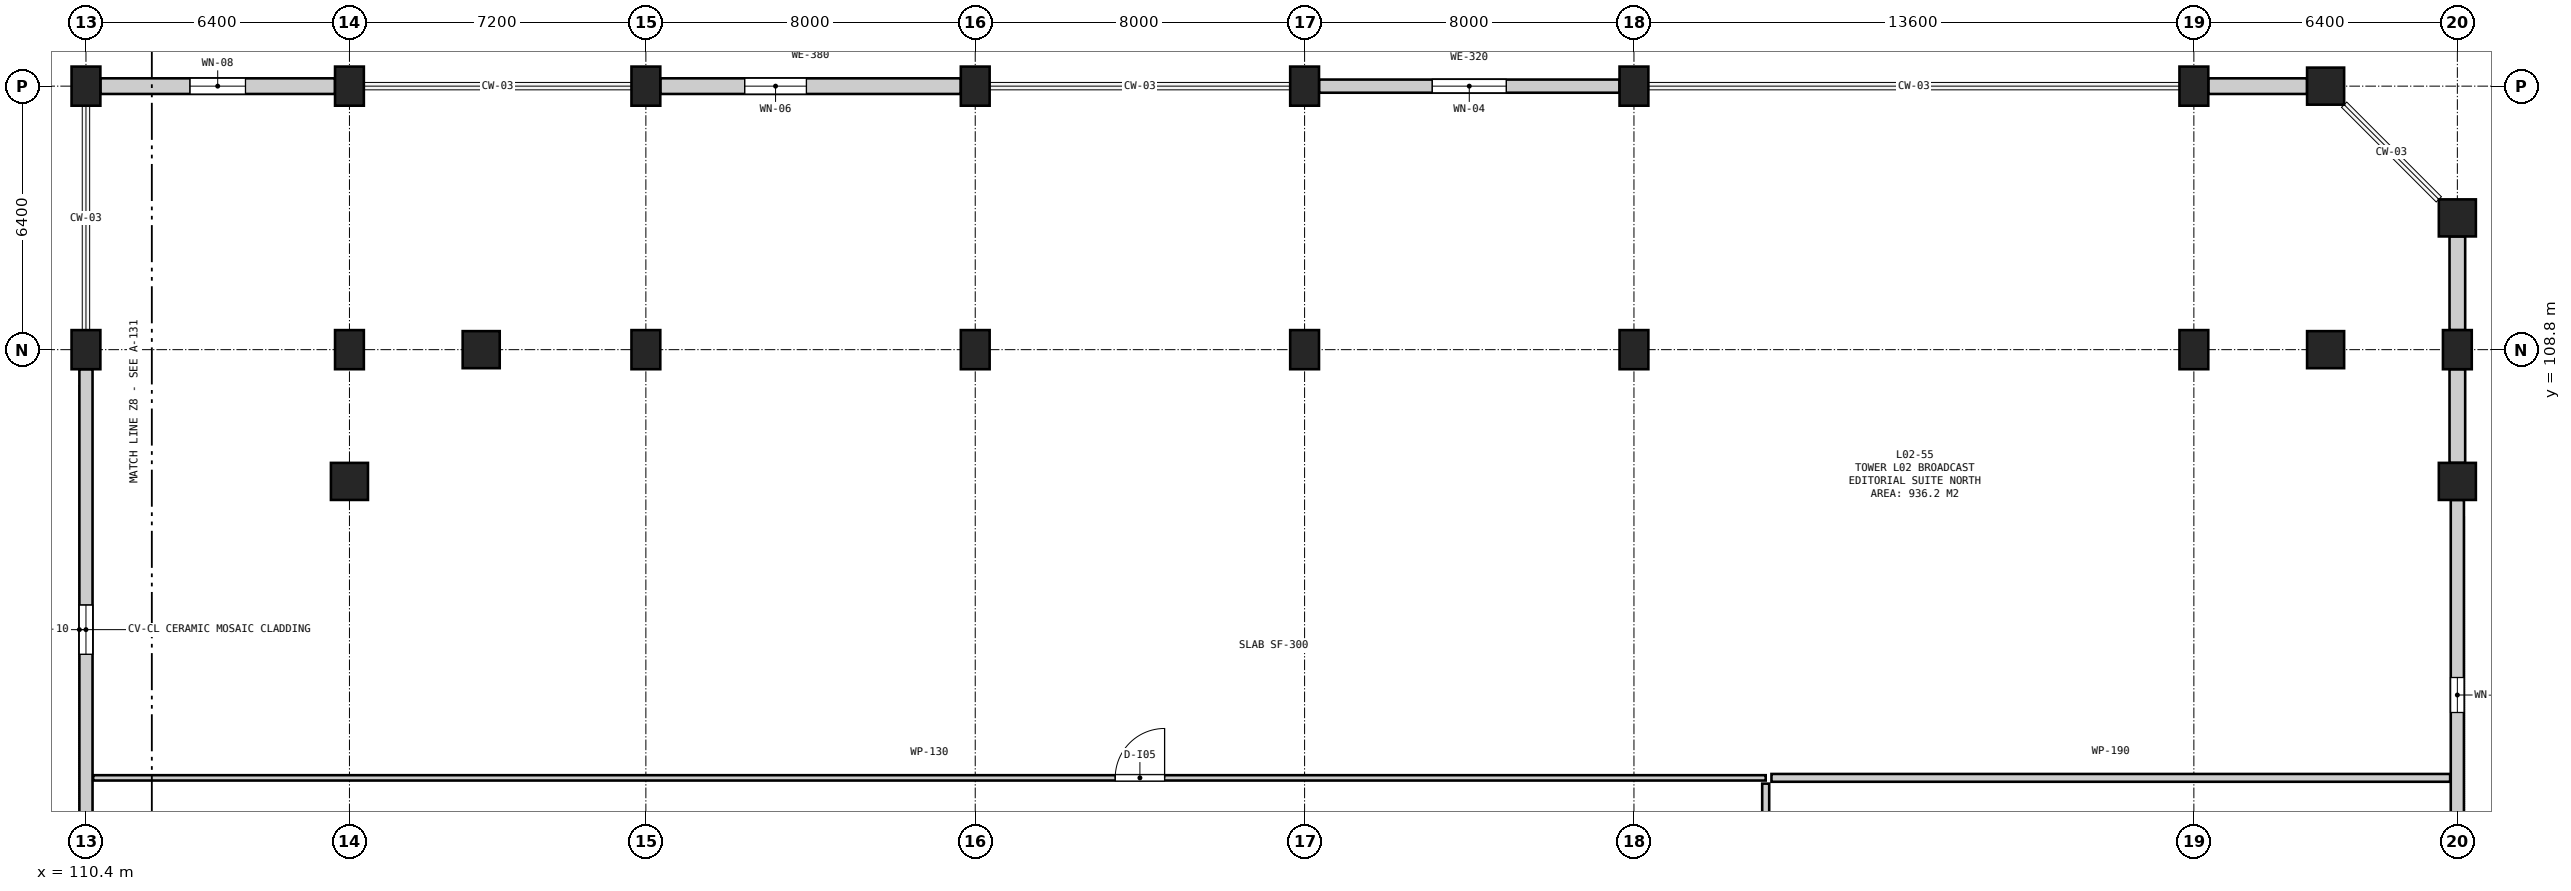
"""IFC4 building model, lengths in metres.
Left out: names, types, materials, properties, quantities, classifications, styles, units other than length and angle.
Written with IfcOpenShell. Run it as: python <this file> out.ifc"""

import sys

from ifc_helpers import new_model, si_unit, direction, frame, frame_2d, origin, origin_2d, place, context, subcontext, project, spatial, rectangle, circle, extrude, element, fill, save


model = new_model("IFC4")
c1 = context("Model", 3, precision=1e-05, world=origin(), true_north=direction((0.0, 1.0)))
c2 = subcontext(c1, "Body", "Model", "MODEL_VIEW")
j1 = project(units=[si_unit("LENGTHUNIT", "METRE"), si_unit("PLANEANGLEUNIT", "RADIAN")], contexts=[c1])
p1 = place(None, origin())
s1 = spatial("IfcSite", under=j1, at=p1, CompositionType="ELEMENT")
p2 = place(p1, origin())
s2 = spatial("IfcBuilding", under=s1, at=p2, CompositionType="ELEMENT")
p3 = place(p2, frame((0.0, 0.0, 10.8)))
s3 = spatial("IfcBuildingStorey", under=s2, at=p3, CompositionType="ELEMENT", Elevation=10.8)
for number, where, z_axis, x_axis in (
    (1, (110.4, 108.8, 0.0), (0.0, 0.0, 1.0), (1.0, 0.0, 0.0)),
    (2, (110.4, 115.2, 0.0), (0.0, 0.0, 1.0), (1.0, 0.0, 0.0)),
):
    element("IfcColumn", number, at=place(p3, frame(where, z_axis=z_axis, x_axis=x_axis)), inside=s3, PredefinedType="COLUMN", context=c2, shape_type="SweptSolid", body=[
        extrude(rectangle(XDim=0.7, YDim=0.95, at=origin_2d()), origin(), (0.0, 0.0, 1.0), 4.8),
    ])
p4 = place(p3, frame((116.8, 105.6, 0.0), z_axis=(0.0, 0.0, 1.0), x_axis=(1.0, 0.0, 0.0)))
e3 = element("IfcColumn", 3, at=p4, inside=s3, PredefinedType="COLUMN", context=c2, shape_type="SweptSolid", body=[
    extrude(circle(Radius=0.45, at=origin_2d()), origin(), (0.0, 0.0, 1.0), 4.8),
])
for number, where, z_axis, x_axis in (
    (4, (116.8, 108.8, 0.0), (0.0, 0.0, 1.0), (1.0, 0.0, 0.0)),
    (5, (116.8, 115.2, 0.0), (0.0, 0.0, 1.0), (1.0, 0.0, 0.0)),
):
    element("IfcColumn", number, at=place(p3, frame(where, z_axis=z_axis, x_axis=x_axis)), inside=s3, PredefinedType="COLUMN", context=c2, shape_type="SweptSolid", body=[
        extrude(rectangle(XDim=0.7, YDim=0.95, at=origin_2d()), origin(), (0.0, 0.0, 1.0), 4.8),
    ])
p5 = place(p3, frame((120.0, 108.8, 0.0), z_axis=(0.0, 0.0, 1.0), x_axis=(1.0, 0.0, 0.0)))
e6 = element("IfcColumn", 6, at=p5, inside=s3, PredefinedType="COLUMN", context=c2, shape_type="SweptSolid", body=[
    extrude(circle(Radius=0.45, at=origin_2d()), origin(), (0.0, 0.0, 1.0), 4.8),
])
for number, where, z_axis, x_axis in (
    (7, (124.0, 108.8, 0.0), (0.0, 0.0, 1.0), (1.0, 0.0, 0.0)),
    (8, (124.0, 115.2, 0.0), (0.0, 0.0, 1.0), (1.0, 0.0, 0.0)),
    (9, (132.0, 108.8, 0.0), (0.0, 0.0, 1.0), (1.0, 0.0, 0.0)),
    (10, (132.0, 115.2, 0.0), (0.0, 0.0, 1.0), (1.0, 0.0, 0.0)),
    (11, (140.0, 108.8, 0.0), (0.0, 0.0, 1.0), (1.0, 0.0, 0.0)),
    (12, (140.0, 115.2, 0.0), (0.0, 0.0, 1.0), (1.0, 0.0, 0.0)),
    (13, (148.0, 108.8, 0.0), (0.0, 0.0, 1.0), (1.0, 0.0, 0.0)),
    (14, (148.0, 115.2, 0.0), (0.0, 0.0, 1.0), (1.0, 0.0, 0.0)),
    (15, (161.6, 108.8, 0.0), (0.0, 0.0, 1.0), (1.0, 0.0, 0.0)),
    (16, (161.6, 115.2, 0.0), (0.0, 0.0, 1.0), (1.0, 0.0, 0.0)),
):
    element("IfcColumn", number, at=place(p3, frame(where, z_axis=z_axis, x_axis=x_axis)), inside=s3, PredefinedType="COLUMN", context=c2, shape_type="SweptSolid", body=[
        extrude(rectangle(XDim=0.7, YDim=0.95, at=origin_2d()), origin(), (0.0, 0.0, 1.0), 4.8),
    ])
for number, where, z_axis, x_axis in (
    (17, (164.8, 108.8, 0.0), (0.0, 0.0, 1.0), (1.0, 0.0, 0.0)),
    (18, (164.8, 115.2, 0.0), (0.0, 0.0, 1.0), (1.0, 0.0, 0.0)),
    (19, (168.0, 105.6, 0.0), (0.0, 0.0, 1.0), (1.0, 0.0, 0.0)),
):
    element("IfcColumn", number, at=place(p3, frame(where, z_axis=z_axis, x_axis=x_axis)), inside=s3, PredefinedType="COLUMN", context=c2, shape_type="SweptSolid", body=[
        extrude(circle(Radius=0.45, at=origin_2d()), origin(), (0.0, 0.0, 1.0), 4.8),
    ])
p6 = place(p3, frame((168.0, 108.8, 0.0), z_axis=(0.0, 0.0, 1.0), x_axis=(1.0, 0.0, 0.0)))
e20 = element("IfcColumn", 20, at=p6, inside=s3, PredefinedType="COLUMN", context=c2, shape_type="SweptSolid", body=[
    extrude(rectangle(XDim=0.7, YDim=0.95, at=origin_2d()), origin(), (0.0, 0.0, 1.0), 4.8),
])
p7 = place(p3, frame((168.0, 112.0, 0.0), z_axis=(0.0, 0.0, 1.0), x_axis=(1.0, 0.0, 0.0)))
e21 = element("IfcColumn", 21, at=p7, inside=s3, PredefinedType="COLUMN", context=c2, shape_type="SweptSolid", body=[
    extrude(circle(Radius=0.45, at=origin_2d()), origin(), (0.0, 0.0, 1.0), 4.8),
])
p8 = place(p3, frame((168.0, 95.675, 0.0), z_axis=(0.0, 0.0, 1.0), x_axis=(0.0, 1.0, 0.0)))
e22 = element("IfcWall", 22, at=p8, inside=s3, PredefinedType="SOLIDWALL", context=c2, shape_type="SweptSolid", body=[
    extrude(rectangle(XDim=9.475, YDim=0.32, at=frame_2d((4.737, 0.0))), origin(), (0.0, 0.0, 1.0), 3.885),
])
p9 = place(p8, frame((4.312, 0.0, 0.9)))
e23 = element("IfcOpeningElement", 23, at=p9, cuts=e22, PredefinedType="OPENING", context=c2, shape_type="SweptSolid", body=[
    extrude(rectangle(XDim=0.85, YDim=1.35, at=frame_2d((0.425, 0.675))), frame((0.0, 0.172, 0.0), z_axis=(0.0, -1.0, 0.0), x_axis=(1.0, 0.0, 0.0)), (0.0, 0.0, 1.0), 0.344),
])
p10 = place(p3, frame((168.0, 106.05, 0.0), z_axis=(0.0, 0.0, 1.0), x_axis=(0.0, 1.0, 0.0)))
e24 = element("IfcWall", 24, at=p10, inside=s3, PredefinedType="SOLIDWALL", context=c2, shape_type="SweptSolid", body=[
    extrude(rectangle(XDim=2.275, YDim=0.38, at=frame_2d((1.137, 0.0))), origin(), (0.0, 0.0, 1.0), 3.885),
])
p11 = place(p3, frame((168.0, 109.275, 0.0), z_axis=(0.0, 0.0, 1.0), x_axis=(0.0, 1.0, 0.0)))
e25 = element("IfcWall", 25, at=p11, inside=s3, PredefinedType="SOLIDWALL", context=c2, shape_type="SweptSolid", body=[
    extrude(rectangle(XDim=2.275, YDim=0.38, at=frame_2d((1.138, 0.0))), origin(), (0.0, 0.0, 1.0), 3.9),
])
p12 = place(p3, frame((164.35, 115.2, 0.0), z_axis=(0.0, 0.0, 1.0), x_axis=(-1.0, 0.0, 0.0)))
e26 = element("IfcWall", 26, at=p12, inside=s3, PredefinedType="SOLIDWALL", context=c2, shape_type="SweptSolid", body=[
    extrude(rectangle(XDim=2.4, YDim=0.38, at=frame_2d((1.2, 0.0))), origin(), (0.0, 0.0, 1.0), 3.9),
])
p13 = place(p3, frame((147.65, 115.2, 0.0), z_axis=(0.0, 0.0, 1.0), x_axis=(-1.0, 0.0, 0.0)))
e27 = element("IfcWall", 27, at=p13, inside=s3, PredefinedType="SOLIDWALL", context=c2, shape_type="SweptSolid", body=[
    extrude(rectangle(XDim=7.3, YDim=0.32, at=frame_2d((3.65, 0.0))), origin(), (0.0, 0.0, 1.0), 3.9),
])
p14 = place(p13, frame((2.75, 0.0, 0.9)))
e28 = element("IfcOpeningElement", 28, at=p14, cuts=e27, PredefinedType="OPENING", context=c2, shape_type="SweptSolid", body=[
    extrude(rectangle(XDim=1.8, YDim=1.85, at=frame_2d((0.9, 0.925))), frame((0.0, 0.172, 0.0), z_axis=(0.0, -1.0, 0.0), x_axis=(1.0, 0.0, 0.0)), (0.0, 0.0, 1.0), 0.344),
])
p15 = place(p3, frame((131.65, 115.2, 0.0), z_axis=(0.0, 0.0, 1.0), x_axis=(-1.0, 0.0, 0.0)))
e29 = element("IfcWall", 29, at=p15, inside=s3, PredefinedType="SOLIDWALL", context=c2, shape_type="SweptSolid", body=[
    extrude(rectangle(XDim=7.3, YDim=0.38, at=frame_2d((3.65, 0.0))), origin(), (0.0, 0.0, 1.0), 3.9),
])
p16 = place(p15, frame((3.75, 0.0, 0.9)))
e30 = element("IfcOpeningElement", 30, at=p16, cuts=e29, PredefinedType="OPENING", context=c2, shape_type="SweptSolid", body=[
    extrude(rectangle(XDim=1.5, YDim=1.85, at=frame_2d((0.75, 0.925))), frame((0.0, 0.202, 0.0), z_axis=(0.0, -1.0, 0.0), x_axis=(1.0, 0.0, 0.0)), (0.0, 0.0, 1.0), 0.404),
])
p17 = place(p3, frame((116.45, 115.2, 0.0), z_axis=(0.0, 0.0, 1.0), x_axis=(-1.0, 0.0, 0.0)))
e31 = element("IfcWall", 31, at=p17, inside=s3, PredefinedType="SOLIDWALL", context=c2, shape_type="SweptSolid", body=[
    extrude(rectangle(XDim=5.7, YDim=0.38, at=frame_2d((2.85, 0.0))), origin(), (0.0, 0.0, 1.0), 3.885),
])
p18 = place(p17, frame((2.175, 0.0, 0.9)))
e32 = element("IfcOpeningElement", 32, at=p18, cuts=e31, PredefinedType="OPENING", context=c2, shape_type="SweptSolid", body=[
    extrude(rectangle(XDim=1.35, YDim=1.75, at=frame_2d((0.675, 0.875))), frame((0.0, 0.202, 0.0), z_axis=(0.0, -1.0, 0.0), x_axis=(1.0, 0.0, 0.0)), (0.0, 0.0, 1.0), 0.404),
])
p19 = place(p3, frame((110.4, 108.325, 0.0), z_axis=(0.0, 0.0, 1.0), x_axis=(0.0, -1.0, 0.0)))
e33 = element("IfcWall", 33, at=p19, inside=s3, PredefinedType="SOLIDWALL", context=c2, shape_type="SweptSolid", body=[
    extrude(rectangle(XDim=12.65, YDim=0.32, at=frame_2d((6.325, 0.0))), origin(), (0.0, 0.0, 1.0), 3.485),
])
p20 = place(p19, frame((5.725, 0.0, 0.9)))
e34 = element("IfcOpeningElement", 34, at=p20, cuts=e33, PredefinedType="OPENING", context=c2, shape_type="SweptSolid", body=[
    extrude(rectangle(XDim=1.2, YDim=1.7, at=frame_2d((0.6, 0.85))), frame((0.0, 0.172, 0.0), z_axis=(0.0, -1.0, 0.0), x_axis=(1.0, 0.0, 0.0)), (0.0, 0.0, 1.0), 0.344),
])
p21 = place(p3, frame((151.34, 98.4, 0.0), z_axis=(0.0, 0.0, 1.0), x_axis=(1.0, 0.0, 0.0)))
e35 = element("IfcWall", 35, at=p21, inside=s3, PredefinedType="PARTITIONING", context=c2, shape_type="SweptSolid", body=[
    extrude(rectangle(XDim=16.485, YDim=0.19, at=frame_2d((8.242, 0.0))), origin(), (0.0, 0.0, 1.0), 4.5),
])
p22 = place(p3, frame((151.2, 76.14, 0.0), z_axis=(0.0, 0.0, 1.0), x_axis=(0.0, 1.0, 0.0)))
e36 = element("IfcWall", 36, at=p22, inside=s3, PredefinedType="PARTITIONING", context=c2, shape_type="SweptSolid", body=[
    extrude(rectangle(XDim=22.12, YDim=0.17, at=frame_2d((11.06, 0.0))), origin(), (0.0, 0.0, 1.0), 4.5),
])
p23 = place(p22, frame((10.46, 0.0, 0.0)))
e37 = element("IfcOpeningElement", 37, at=p23, cuts=e36, PredefinedType="OPENING", context=c2, shape_type="SweptSolid", body=[
    extrude(rectangle(XDim=1.2, YDim=2.15, at=frame_2d((0.6, 1.075))), frame((0.0, 0.097, 0.0), z_axis=(0.0, -1.0, 0.0), x_axis=(1.0, 0.0, 0.0)), (0.0, 0.0, 1.0), 0.194),
])
p24 = place(p3, frame((110.575, 98.4, 0.0), z_axis=(0.0, 0.0, 1.0), x_axis=(1.0, 0.0, 0.0)))
e38 = element("IfcWall", 38, at=p24, inside=s3, PredefinedType="PARTITIONING", context=c2, shape_type="SweptSolid", body=[
    extrude(rectangle(XDim=40.625, YDim=0.13, at=frame_2d((20.312, 0.0))), origin(), (0.0, 0.0, 1.0), 4.5),
])
p25 = place(p24, frame((24.825, 0.0, 0.0)))
e39 = element("IfcOpeningElement", 39, at=p25, cuts=e38, PredefinedType="OPENING", context=c2, shape_type="SweptSolid", body=[
    extrude(rectangle(XDim=1.2, YDim=2.15, at=frame_2d((0.6, 1.075))), frame((0.0, 0.077, 0.0), z_axis=(0.0, -1.0, 0.0), x_axis=(1.0, 0.0, 0.0)), (0.0, 0.0, 1.0), 0.154),
])
p26 = place(p9, origin())
e40 = element("IfcWindow", 40, at=p26, inside=s3, PartitioningType="SINGLE_PANEL", PredefinedType="WINDOW", context=c2, shape_type="SweptSolid", body=[
    extrude(rectangle(XDim=0.85, YDim=1.35, at=frame_2d((0.425, 0.675))), frame((0.0, 0.03, 0.0), z_axis=(0.0, -1.0, 0.0), x_axis=(1.0, 0.0, 0.0)), (0.0, 0.0, 1.0), 0.06),
])
fill(e23, e40)
p27 = place(p14, origin())
e41 = element("IfcWindow", 41, at=p27, inside=s3, PartitioningType="DOUBLE_PANEL_VERTICAL", PredefinedType="WINDOW", context=c2, shape_type="SweptSolid", body=[
    extrude(rectangle(XDim=1.8, YDim=1.85, at=frame_2d((0.9, 0.925))), frame((0.0, 0.03, 0.0), z_axis=(0.0, -1.0, 0.0), x_axis=(1.0, 0.0, 0.0)), (0.0, 0.0, 1.0), 0.06),
])
fill(e28, e41)
p28 = place(p16, origin())
e42 = element("IfcWindow", 42, at=p28, inside=s3, PartitioningType="SINGLE_PANEL", PredefinedType="WINDOW", context=c2, shape_type="SweptSolid", body=[
    extrude(rectangle(XDim=1.5, YDim=1.85, at=frame_2d((0.75, 0.925))), frame((0.0, 0.03, 0.0), z_axis=(0.0, -1.0, 0.0), x_axis=(1.0, 0.0, 0.0)), (0.0, 0.0, 1.0), 0.06),
])
fill(e30, e42)
p29 = place(p18, origin())
e43 = element("IfcWindow", 43, at=p29, inside=s3, PartitioningType="SINGLE_PANEL", PredefinedType="WINDOW", context=c2, shape_type="SweptSolid", body=[
    extrude(rectangle(XDim=1.35, YDim=1.75, at=frame_2d((0.675, 0.875))), frame((0.0, 0.03, 0.0), z_axis=(0.0, -1.0, 0.0), x_axis=(1.0, 0.0, 0.0)), (0.0, 0.0, 1.0), 0.06),
])
fill(e32, e43)
p30 = place(p20, origin())
e44 = element("IfcWindow", 44, at=p30, inside=s3, PartitioningType="SINGLE_PANEL", PredefinedType="WINDOW", context=c2, shape_type="SweptSolid", body=[
    extrude(rectangle(XDim=1.2, YDim=1.7, at=frame_2d((0.6, 0.85))), frame((0.0, 0.03, 0.0), z_axis=(0.0, -1.0, 0.0), x_axis=(1.0, 0.0, 0.0)), (0.0, 0.0, 1.0), 0.06),
])
fill(e34, e44)
p31 = place(p25, origin())
e45 = element("IfcDoor", 45, at=p31, inside=s3, OperationType="SINGLE_SWING_RIGHT", PredefinedType="DOOR", context=c2, shape_type="SweptSolid", body=[
    extrude(rectangle(XDim=1.2, YDim=2.15, at=frame_2d((0.6, 1.075))), frame((0.0, 0.025, 0.0), z_axis=(0.0, -1.0, 0.0), x_axis=(1.0, 0.0, 0.0)), (0.0, 0.0, 1.0), 0.05),
])
fill(e39, e45)
save(model, sys.argv[1])
